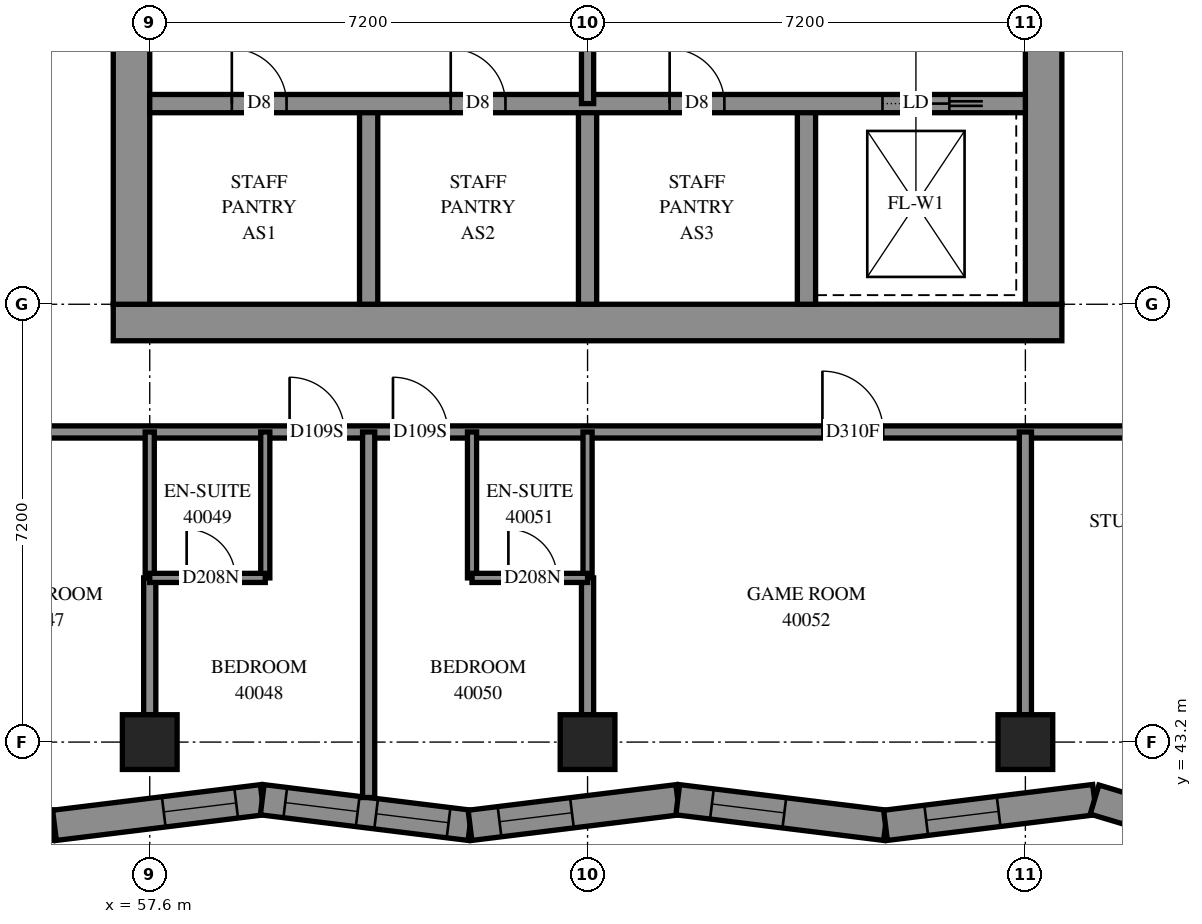
"""IFC4 building model, lengths in metres.
Left out: names, types, materials, properties, quantities, classifications, styles, units other than length and angle.
Written with IfcOpenShell. Run it as: python <this file> out.ifc"""

import sys

from ifc_helpers import new_model, si_unit, direction, frame, frame_2d, origin, origin_2d, place, context, subcontext, project, spatial, polyline, rectangle, outline, extrude, element, fill, save


model = new_model("IFC4")
c1 = context("Model", 3, precision=1e-05, world=origin(), true_north=direction((0.0, 1.0)))
c2 = subcontext(c1, "Body", "Model", "MODEL_VIEW")
j1 = project(units=[si_unit("LENGTHUNIT", "METRE"), si_unit("PLANEANGLEUNIT", "RADIAN")], contexts=[c1])
p1 = place(None, origin())
s1 = spatial("IfcSite", under=j1, at=p1, CompositionType="ELEMENT")
p2 = place(p1, origin())
s2 = spatial("IfcBuilding", under=s1, at=p2, CompositionType="ELEMENT")
p3 = place(p2, frame((0.0, 0.0, 149.0)))
s3 = spatial("IfcBuildingStorey", under=s2, at=p3, CompositionType="ELEMENT", Elevation=149.0)
for number, where, z_axis, x_axis in (
    (1, (57.6, 43.2, 0.0), (0.0, 0.0, 1.0), (1.0, 0.0, 0.0)),
    (2, (64.8, 43.2, 0.0), (0.0, 0.0, 1.0), (1.0, 0.0, 0.0)),
    (3, (72.0, 43.2, 0.0), (0.0, 0.0, 1.0), (1.0, 0.0, 0.0)),
):
    element("IfcColumn", number, at=place(p3, frame(where, z_axis=z_axis, x_axis=x_axis)), inside=s3, PredefinedType="COLUMN", context=c2, shape_type="SweptSolid", body=[
        extrude(rectangle(XDim=0.9, YDim=0.9, at=origin_2d()), origin(), (0.0, 0.0, 1.0), 3.1),
    ])
p4 = place(p3, frame((57.0, 50.1, -0.3), z_axis=(0.0, 0.0, 1.0), x_axis=(1.0, 0.0, 0.0)))
e4 = element("IfcWall", 4, at=p4, inside=s3, PredefinedType="SHEAR", context=c2, shape_type="SweptSolid", body=[
    extrude(rectangle(XDim=15.6, YDim=0.6, at=frame_2d((7.8, 0.0))), origin(), (0.0, 0.0, 1.0), 2.7),
])
p5 = place(p3, frame((57.3, 50.4, -0.3), z_axis=(0.0, 0.0, 1.0), x_axis=(0.0, 1.0, 0.0)))
e5 = element("IfcWall", 5, at=p5, inside=s3, PredefinedType="SHEAR", context=c2, shape_type="SweptSolid", body=[
    extrude(rectangle(XDim=14.4, YDim=0.6, at=frame_2d((7.2, 0.0))), origin(), (0.0, 0.0, 1.0), 2.7),
])
p6 = place(p5, frame((4.55, 0.0, 0.3)))
e6 = element("IfcOpeningElement", 6, at=p6, cuts=e5, PredefinedType="OPENING", context=c2, shape_type="SweptSolid", body=[
    extrude(rectangle(XDim=1.1, YDim=2.1, at=frame_2d((0.55, 1.05))), frame((0.0, 0.31, 0.0), z_axis=(0.0, -1.0, 0.0), x_axis=(1.0, 0.0, 0.0)), (0.0, 0.0, 1.0), 0.62),
])
p7 = place(p5, frame((11.35, 0.0, 0.3)))
e7 = element("IfcOpeningElement", 7, at=p7, cuts=e5, PredefinedType="OPENING", context=c2, shape_type="SweptSolid", body=[
    extrude(rectangle(XDim=1.1, YDim=2.1, at=frame_2d((0.55, 1.05))), frame((0.0, 0.31, 0.0), z_axis=(0.0, -1.0, 0.0), x_axis=(1.0, 0.0, 0.0)), (0.0, 0.0, 1.0), 0.62),
])
p8 = place(p3, frame((72.3, 50.4, -0.3), z_axis=(0.0, 0.0, 1.0), x_axis=(0.0, 1.0, 0.0)))
e8 = element("IfcWall", 8, at=p8, inside=s3, PredefinedType="SHEAR", context=c2, shape_type="SweptSolid", body=[
    extrude(rectangle(XDim=14.4, YDim=0.6, at=frame_2d((7.2, 0.0))), origin(), (0.0, 0.0, 1.0), 2.7),
])
p9 = place(p8, frame((4.55, 0.0, 0.3)))
e9 = element("IfcOpeningElement", 9, at=p9, cuts=e8, PredefinedType="OPENING", context=c2, shape_type="SweptSolid", body=[
    extrude(rectangle(XDim=1.1, YDim=2.1, at=frame_2d((0.55, 1.05))), frame((0.0, 0.31, 0.0), z_axis=(0.0, -1.0, 0.0), x_axis=(1.0, 0.0, 0.0)), (0.0, 0.0, 1.0), 0.62),
])
p10 = place(p8, frame((11.35, 0.0, 0.3)))
e10 = element("IfcOpeningElement", 10, at=p10, cuts=e8, PredefinedType="OPENING", context=c2, shape_type="SweptSolid", body=[
    extrude(rectangle(XDim=1.1, YDim=2.1, at=frame_2d((0.55, 1.05))), frame((0.0, 0.31, 0.0), z_axis=(0.0, -1.0, 0.0), x_axis=(1.0, 0.0, 0.0)), (0.0, 0.0, 1.0), 0.62),
])
for number, where, z_axis, x_axis in (
    (11, (61.2, 50.4, 0.0), (0.0, 0.0, 1.0), (0.0, 1.0, 0.0)),
    (12, (64.8, 50.4, 0.0), (0.0, 0.0, 1.0), (0.0, 1.0, 0.0)),
    (13, (68.4, 50.4, 0.0), (0.0, 0.0, 1.0), (0.0, 1.0, 0.0)),
):
    element("IfcWall", number, at=place(p3, frame(where, z_axis=z_axis, x_axis=x_axis)), inside=s3, PredefinedType="SOLIDWALL", context=c2, shape_type="SweptSolid", body=[
        extrude(rectangle(XDim=3.3, YDim=0.3, at=frame_2d((1.65, 0.0))), origin(), (0.0, 0.0, 1.0), 3.1),
    ])
p11 = place(p3, frame((57.6, 53.7, 0.0), z_axis=(0.0, 0.0, 1.0), x_axis=(1.0, 0.0, 0.0)))
e14 = element("IfcWall", 14, at=p11, inside=s3, PredefinedType="SOLIDWALL", context=c2, shape_type="SweptSolid", body=[
    extrude(rectangle(XDim=14.4, YDim=0.3, at=frame_2d((7.2, 0.0))), origin(), (0.0, 0.0, 1.0), 3.1),
])
p12 = place(p11, frame((1.35, 0.0, 0.0)))
e15 = element("IfcOpeningElement", 15, at=p12, cuts=e14, PredefinedType="OPENING", context=c2, shape_type="SweptSolid", body=[
    extrude(rectangle(XDim=0.9, YDim=2.1, at=frame_2d((0.45, 1.05))), frame((0.0, 0.16, 0.0), z_axis=(0.0, -1.0, 0.0), x_axis=(1.0, 0.0, 0.0)), (0.0, 0.0, 1.0), 0.32),
])
p13 = place(p11, frame((4.95, 0.0, 0.0)))
e16 = element("IfcOpeningElement", 16, at=p13, cuts=e14, PredefinedType="OPENING", context=c2, shape_type="SweptSolid", body=[
    extrude(rectangle(XDim=0.9, YDim=2.1, at=frame_2d((0.45, 1.05))), frame((0.0, 0.16, 0.0), z_axis=(0.0, -1.0, 0.0), x_axis=(1.0, 0.0, 0.0)), (0.0, 0.0, 1.0), 0.32),
])
p14 = place(p11, frame((8.55, 0.0, 0.0)))
e17 = element("IfcOpeningElement", 17, at=p14, cuts=e14, PredefinedType="OPENING", context=c2, shape_type="SweptSolid", body=[
    extrude(rectangle(XDim=0.9, YDim=2.1, at=frame_2d((0.45, 1.05))), frame((0.0, 0.16, 0.0), z_axis=(0.0, -1.0, 0.0), x_axis=(1.0, 0.0, 0.0)), (0.0, 0.0, 1.0), 0.32),
])
p15 = place(p11, frame((12.05, 0.0, 0.0)))
e18 = element("IfcOpeningElement", 18, at=p15, cuts=e14, PredefinedType="OPENING", context=c2, shape_type="SweptSolid", body=[
    extrude(rectangle(XDim=1.1, YDim=2.1, at=frame_2d((0.55, 1.05))), frame((0.0, 0.16, 0.0), z_axis=(0.0, -1.0, 0.0), x_axis=(1.0, 0.0, 0.0)), (0.0, 0.0, 1.0), 0.32),
])
p16 = place(p3, frame((52.595, 42.255, 0.0), z_axis=(0.0, 0.0, 1.0), x_axis=(0.9924948483, -0.1222864508, 0.0)))
e19 = element("IfcWall", 19, at=p16, inside=s3, PredefinedType="SOLIDWALL", context=c2, shape_type="SweptSolid", body=[
    extrude(outline(polyline([(0.052, -0.25), (3.495, -0.25), (3.433, 0.25), (-0.052, 0.25), (0.052, -0.25)])), origin(), (0.0, 0.0, 1.0), 3.1),
])
p17 = place(p16, frame((1.724, 0.0, 0.45)))
e20 = element("IfcOpeningElement", 20, at=p17, cuts=e19, PredefinedType="OPENING", context=c2, shape_type="SweptSolid", body=[
    extrude(rectangle(XDim=1.2, YDim=2.5, at=frame_2d((0.6, 1.25))), frame((0.0, 0.26, 0.0), z_axis=(0.0, -1.0, 0.0), x_axis=(1.0, 0.0, 0.0)), (0.0, 0.0, 1.0), 0.52),
])
p18 = place(p3, frame((56.033, 41.831, 0.0), z_axis=(0.0, 0.0, 1.0), x_axis=(0.9924939881, 0.122293432, 0.0)))
e21 = element("IfcWall", 21, at=p18, inside=s3, PredefinedType="SOLIDWALL", context=c2, shape_type="SweptSolid", body=[
    extrude(outline(polyline([(-0.031, -0.25), (3.412, -0.25), (3.473, 0.25), (0.031, 0.25), (-0.031, -0.25)])), origin(), (0.0, 0.0, 1.0), 3.1),
])
p19 = place(p18, frame((1.81, 0.0, 0.45)))
e22 = element("IfcOpeningElement", 22, at=p19, cuts=e21, PredefinedType="OPENING", context=c2, shape_type="SweptSolid", body=[
    extrude(rectangle(XDim=1.2, YDim=2.5, at=frame_2d((0.6, 1.25))), frame((0.0, 0.26, 0.0), z_axis=(0.0, -1.0, 0.0), x_axis=(1.0, 0.0, 0.0)), (0.0, 0.0, 1.0), 0.52),
])
p20 = place(p3, frame((59.45, 42.252, 0.0), z_axis=(0.0, 0.0, 1.0), x_axis=(0.9924935537, -0.1222969578, 0.0)))
e23 = element("IfcWall", 23, at=p20, inside=s3, PredefinedType="SOLIDWALL", context=c2, shape_type="SweptSolid", body=[
    extrude(outline(polyline([(0.031, -0.25), (3.473, -0.25), (3.412, 0.25), (-0.031, 0.25), (0.031, -0.25)])), origin(), (0.0, 0.0, 1.0), 3.1),
])
p21 = place(p20, frame((0.382, 0.0, 0.45)))
e24 = element("IfcOpeningElement", 24, at=p21, cuts=e23, PredefinedType="OPENING", context=c2, shape_type="SweptSolid", body=[
    extrude(rectangle(XDim=1.2, YDim=2.5, at=frame_2d((0.6, 1.25))), frame((0.0, 0.26, 0.0), z_axis=(0.0, -1.0, 0.0), x_axis=(1.0, 0.0, 0.0)), (0.0, 0.0, 1.0), 0.52),
])
p22 = place(p20, frame((1.887, 0.0, 0.45)))
e25 = element("IfcOpeningElement", 25, at=p22, cuts=e23, PredefinedType="OPENING", context=c2, shape_type="SweptSolid", body=[
    extrude(rectangle(XDim=1.2, YDim=2.5, at=frame_2d((0.6, 1.25))), frame((0.0, 0.26, 0.0), z_axis=(0.0, -1.0, 0.0), x_axis=(1.0, 0.0, 0.0)), (0.0, 0.0, 1.0), 0.52),
])
p23 = place(p3, frame((62.867, 41.831, 0.0), z_axis=(0.0, 0.0, 1.0), x_axis=(0.9924935537, 0.1222969578, 0.0)))
e26 = element("IfcWall", 26, at=p23, inside=s3, PredefinedType="SOLIDWALL", context=c2, shape_type="SweptSolid", body=[
    extrude(outline(polyline([(-0.031, -0.25), (3.412, -0.25), (3.473, 0.25), (0.031, 0.25), (-0.031, -0.25)])), origin(), (0.0, 0.0, 1.0), 3.1),
])
p24 = place(p23, frame((0.489, 0.0, 0.45)))
e27 = element("IfcOpeningElement", 27, at=p24, cuts=e26, PredefinedType="OPENING", context=c2, shape_type="SweptSolid", body=[
    extrude(rectangle(XDim=1.2, YDim=2.5, at=frame_2d((0.6, 1.25))), frame((0.0, 0.26, 0.0), z_axis=(0.0, -1.0, 0.0), x_axis=(1.0, 0.0, 0.0)), (0.0, 0.0, 1.0), 0.52),
])
p25 = place(p3, frame((66.283, 42.252, 0.0), z_axis=(0.0, 0.0, 1.0), x_axis=(0.9924935537, -0.1222969578, 0.0)))
e28 = element("IfcWall", 28, at=p25, inside=s3, PredefinedType="SOLIDWALL", context=c2, shape_type="SweptSolid", body=[
    extrude(outline(polyline([(0.031, -0.25), (3.473, -0.25), (3.412, 0.25), (-0.031, 0.25), (0.031, -0.25)])), origin(), (0.0, 0.0, 1.0), 3.1),
])
p26 = place(p25, frame((0.566, 0.0, 0.45)))
e29 = element("IfcOpeningElement", 29, at=p26, cuts=e28, PredefinedType="OPENING", context=c2, shape_type="SweptSolid", body=[
    extrude(rectangle(XDim=1.2, YDim=2.5, at=frame_2d((0.6, 1.25))), frame((0.0, 0.26, 0.0), z_axis=(0.0, -1.0, 0.0), x_axis=(1.0, 0.0, 0.0)), (0.0, 0.0, 1.0), 0.52),
])
p27 = place(p3, frame((69.7, 41.831, 0.0), z_axis=(0.0, 0.0, 1.0), x_axis=(0.99249528, 0.1222829472, 0.0)))
e30 = element("IfcWall", 30, at=p27, inside=s3, PredefinedType="SOLIDWALL", context=c2, shape_type="SweptSolid", body=[
    extrude(outline(polyline([(-0.031, -0.25), (3.412, -0.25), (3.516, 0.25), (0.031, 0.25), (-0.031, -0.25)])), origin(), (0.0, 0.0, 1.0), 3.1),
])
p28 = place(p27, frame((0.674, 0.0, 0.45)))
e31 = element("IfcOpeningElement", 31, at=p28, cuts=e30, PredefinedType="OPENING", context=c2, shape_type="SweptSolid", body=[
    extrude(rectangle(XDim=1.2, YDim=2.5, at=frame_2d((0.6, 1.25))), frame((0.0, 0.26, 0.0), z_axis=(0.0, -1.0, 0.0), x_axis=(1.0, 0.0, 0.0)), (0.0, 0.0, 1.0), 0.52),
])
p29 = place(p3, frame((73.138, 42.255, 0.0), z_axis=(0.0, 0.0, 1.0), x_axis=(0.9581356877, -0.2863145194, 0.0)))
e32 = element("IfcWall", 32, at=p29, inside=s3, PredefinedType="SOLIDWALL", context=c2, shape_type="SweptSolid", body=[
    extrude(outline(polyline([(0.052, -0.25), (3.618, -0.25), (3.681, 0.25), (-0.052, 0.25), (0.052, -0.25)])), origin(), (0.0, 0.0, 1.0), 3.1),
])
p30 = place(p29, frame((0.785, 0.0, 0.45)))
e33 = element("IfcOpeningElement", 33, at=p30, cuts=e32, PredefinedType="OPENING", context=c2, shape_type="SweptSolid", body=[
    extrude(rectangle(XDim=1.2, YDim=2.5, at=frame_2d((0.6, 1.25))), frame((0.0, 0.26, 0.0), z_axis=(0.0, -1.0, 0.0), x_axis=(1.0, 0.0, 0.0)), (0.0, 0.0, 1.0), 0.52),
])
p31 = place(p3, frame((64.8, 53.7, 0.0), z_axis=(0.0, 0.0, 1.0), x_axis=(0.0, 1.0, 0.0)))
e34 = element("IfcWall", 34, at=p31, inside=s3, PredefinedType="PARTITIONING", context=c2, shape_type="SweptSolid", body=[
    extrude(rectangle(XDim=3.6, YDim=0.2, at=frame_2d((1.8, 0.0))), origin(), (0.0, 0.0, 1.0), 3.1),
])
p32 = place(p3, frame((55.5, 48.3, 0.0), z_axis=(0.0, 0.0, 1.0), x_axis=(1.0, 0.0, 0.0)))
e35 = element("IfcWall", 35, at=p32, inside=s3, PredefinedType="PARTITIONING", context=c2, shape_type="SweptSolid", body=[
    extrude(rectangle(XDim=18.974, YDim=0.2, at=frame_2d((9.487, 0.0))), origin(), (0.0, 0.0, 1.0), 3.1),
])
p33 = place(p32, frame((4.4, 0.0, 0.0)))
e36 = element("IfcOpeningElement", 36, at=p33, cuts=e35, PredefinedType="OPENING", context=c2, shape_type="SweptSolid", body=[
    extrude(rectangle(XDim=0.9, YDim=2.1, at=frame_2d((0.45, 1.05))), frame((0.0, 0.11, 0.0), z_axis=(0.0, -1.0, 0.0), x_axis=(1.0, 0.0, 0.0)), (0.0, 0.0, 1.0), 0.22),
])
p34 = place(p32, frame((6.1, 0.0, 0.0)))
e37 = element("IfcOpeningElement", 37, at=p34, cuts=e35, PredefinedType="OPENING", context=c2, shape_type="SweptSolid", body=[
    extrude(rectangle(XDim=0.9, YDim=2.1, at=frame_2d((0.45, 1.05))), frame((0.0, 0.11, 0.0), z_axis=(0.0, -1.0, 0.0), x_axis=(1.0, 0.0, 0.0)), (0.0, 0.0, 1.0), 0.22),
])
p35 = place(p32, frame((13.162, 0.0, 0.0)))
e38 = element("IfcOpeningElement", 38, at=p35, cuts=e35, PredefinedType="OPENING", context=c2, shape_type="SweptSolid", body=[
    extrude(rectangle(XDim=1.0, YDim=2.1, at=frame_2d((0.5, 1.05))), frame((0.0, 0.11, 0.0), z_axis=(0.0, -1.0, 0.0), x_axis=(1.0, 0.0, 0.0)), (0.0, 0.0, 1.0), 0.22),
])
p36 = place(p3, frame((61.2, 42.288, 0.0), z_axis=(0.0, 0.0, 1.0), x_axis=(0.0, 1.0, 0.0)))
e39 = element("IfcWall", 39, at=p36, inside=s3, PredefinedType="PARTITIONING", context=c2, shape_type="SweptSolid", body=[
    extrude(rectangle(XDim=6.012, YDim=0.2, at=frame_2d((3.006, 0.0))), origin(), (0.0, 0.0, 1.0), 3.1),
])
p37 = place(p3, frame((72.0, 43.65, 0.0), z_axis=(0.0, 0.0, 1.0), x_axis=(0.0, 1.0, 0.0)))
e40 = element("IfcWall", 40, at=p37, inside=s3, PredefinedType="PARTITIONING", context=c2, shape_type="SweptSolid", body=[
    extrude(rectangle(XDim=4.65, YDim=0.2, at=frame_2d((2.325, 0.0))), origin(), (0.0, 0.0, 1.0), 3.1),
])
for number, where, z_axis, x_axis in (
    (41, (59.5, 45.9, 0.0), (0.0, 0.0, 1.0), (0.0, 1.0, 0.0)),
    (42, (57.6, 45.9, 0.0), (0.0, 0.0, 1.0), (0.0, 1.0, 0.0)),
    (43, (62.9, 45.9, 0.0), (0.0, 0.0, 1.0), (0.0, 1.0, 0.0)),
    (44, (64.8, 45.9, 0.0), (0.0, 0.0, 1.0), (0.0, 1.0, 0.0)),
):
    element("IfcWall", number, at=place(p3, frame(where, z_axis=z_axis, x_axis=x_axis)), inside=s3, PredefinedType="PARTITIONING", context=c2, shape_type="SweptSolid", body=[
        extrude(rectangle(XDim=2.4, YDim=0.15, at=frame_2d((1.2, 0.0))), origin(), (0.0, 0.0, 1.0), 3.1),
    ])
for number, where, z_axis, x_axis in (
    (45, (57.6, 43.65, 0.0), (0.0, 0.0, 1.0), (0.0, 1.0, 0.0)),
    (46, (64.8, 43.65, 0.0), (0.0, 0.0, 1.0), (0.0, 1.0, 0.0)),
):
    element("IfcWall", number, at=place(p3, frame(where, z_axis=z_axis, x_axis=x_axis)), inside=s3, PredefinedType="PARTITIONING", context=c2, shape_type="SweptSolid", body=[
        extrude(rectangle(XDim=2.25, YDim=0.2, at=frame_2d((1.125, 0.0))), origin(), (0.0, 0.0, 1.0), 3.1),
    ])
p38 = place(p3, frame((57.6, 45.9, 0.0), z_axis=(0.0, 0.0, 1.0), x_axis=(1.0, 0.0, 0.0)))
e47 = element("IfcWall", 47, at=p38, inside=s3, PredefinedType="PARTITIONING", context=c2, shape_type="SweptSolid", body=[
    extrude(rectangle(XDim=1.9, YDim=0.15, at=frame_2d((0.95, 0.0))), origin(), (0.0, 0.0, 1.0), 3.1),
])
p39 = place(p38, frame((0.607, 0.0, 0.0)))
e48 = element("IfcOpeningElement", 48, at=p39, cuts=e47, PredefinedType="OPENING", context=c2, shape_type="SweptSolid", body=[
    extrude(rectangle(XDim=0.8, YDim=2.1, at=frame_2d((0.4, 1.05))), frame((0.0, 0.085, 0.0), z_axis=(0.0, -1.0, 0.0), x_axis=(1.0, 0.0, 0.0)), (0.0, 0.0, 1.0), 0.17),
])
p40 = place(p3, frame((62.9, 45.9, 0.0), z_axis=(0.0, 0.0, 1.0), x_axis=(1.0, 0.0, 0.0)))
e49 = element("IfcWall", 49, at=p40, inside=s3, PredefinedType="PARTITIONING", context=c2, shape_type="SweptSolid", body=[
    extrude(rectangle(XDim=1.9, YDim=0.15, at=frame_2d((0.95, 0.0))), origin(), (0.0, 0.0, 1.0), 3.1),
])
p41 = place(p40, frame((0.598, 0.0, 0.0)))
e50 = element("IfcOpeningElement", 50, at=p41, cuts=e49, PredefinedType="OPENING", context=c2, shape_type="SweptSolid", body=[
    extrude(rectangle(XDim=0.8, YDim=2.1, at=frame_2d((0.4, 1.05))), frame((0.0, 0.085, 0.0), z_axis=(0.0, -1.0, 0.0), x_axis=(1.0, 0.0, 0.0)), (0.0, 0.0, 1.0), 0.17),
])
p42 = place(p19, origin())
e51 = element("IfcWindow", 51, at=p42, inside=s3, PartitioningType="SINGLE_PANEL", PredefinedType="WINDOW", context=c2, shape_type="SweptSolid", body=[
    extrude(rectangle(XDim=1.2, YDim=2.5, at=frame_2d((0.6, 1.25))), frame((0.0, 0.18, 0.0), z_axis=(0.0, -1.0, 0.0), x_axis=(1.0, 0.0, 0.0)), (0.0, 0.0, 1.0), 0.06),
])
fill(e22, e51)
p43 = place(p21, origin())
e52 = element("IfcWindow", 52, at=p43, inside=s3, PartitioningType="SINGLE_PANEL", PredefinedType="WINDOW", context=c2, shape_type="SweptSolid", body=[
    extrude(rectangle(XDim=1.2, YDim=2.5, at=frame_2d((0.6, 1.25))), frame((0.0, 0.18, 0.0), z_axis=(0.0, -1.0, 0.0), x_axis=(1.0, 0.0, 0.0)), (0.0, 0.0, 1.0), 0.06),
])
fill(e24, e52)
p44 = place(p22, origin())
e53 = element("IfcWindow", 53, at=p44, inside=s3, PartitioningType="SINGLE_PANEL", PredefinedType="WINDOW", context=c2, shape_type="SweptSolid", body=[
    extrude(rectangle(XDim=1.2, YDim=2.5, at=frame_2d((0.6, 1.25))), frame((0.0, 0.18, 0.0), z_axis=(0.0, -1.0, 0.0), x_axis=(1.0, 0.0, 0.0)), (0.0, 0.0, 1.0), 0.06),
])
fill(e25, e53)
p45 = place(p24, origin())
e54 = element("IfcWindow", 54, at=p45, inside=s3, PartitioningType="SINGLE_PANEL", PredefinedType="WINDOW", context=c2, shape_type="SweptSolid", body=[
    extrude(rectangle(XDim=1.2, YDim=2.5, at=frame_2d((0.6, 1.25))), frame((0.0, 0.18, 0.0), z_axis=(0.0, -1.0, 0.0), x_axis=(1.0, 0.0, 0.0)), (0.0, 0.0, 1.0), 0.06),
])
fill(e27, e54)
p46 = place(p26, origin())
e55 = element("IfcWindow", 55, at=p46, inside=s3, PartitioningType="SINGLE_PANEL", PredefinedType="WINDOW", context=c2, shape_type="SweptSolid", body=[
    extrude(rectangle(XDim=1.2, YDim=2.5, at=frame_2d((0.6, 1.25))), frame((0.0, 0.18, 0.0), z_axis=(0.0, -1.0, 0.0), x_axis=(1.0, 0.0, 0.0)), (0.0, 0.0, 1.0), 0.06),
])
fill(e29, e55)
p47 = place(p28, origin())
e56 = element("IfcWindow", 56, at=p47, inside=s3, PartitioningType="SINGLE_PANEL", PredefinedType="WINDOW", context=c2, shape_type="SweptSolid", body=[
    extrude(rectangle(XDim=1.2, YDim=2.5, at=frame_2d((0.6, 1.25))), frame((0.0, 0.18, 0.0), z_axis=(0.0, -1.0, 0.0), x_axis=(1.0, 0.0, 0.0)), (0.0, 0.0, 1.0), 0.06),
])
fill(e31, e56)
p48 = place(p12, origin())
e57 = element("IfcDoor", 57, at=p48, inside=s3, OperationType="SINGLE_SWING_LEFT", PredefinedType="DOOR", context=c2, shape_type="SweptSolid", body=[
    extrude(rectangle(XDim=0.9, YDim=2.1, at=frame_2d((0.45, 1.05))), frame((0.0, 0.025, 0.0), z_axis=(0.0, -1.0, 0.0), x_axis=(1.0, 0.0, 0.0)), (0.0, 0.0, 1.0), 0.05),
])
fill(e15, e57)
p49 = place(p13, origin())
e58 = element("IfcDoor", 58, at=p49, inside=s3, OperationType="SINGLE_SWING_LEFT", PredefinedType="DOOR", context=c2, shape_type="SweptSolid", body=[
    extrude(rectangle(XDim=0.9, YDim=2.1, at=frame_2d((0.45, 1.05))), frame((0.0, 0.025, 0.0), z_axis=(0.0, -1.0, 0.0), x_axis=(1.0, 0.0, 0.0)), (0.0, 0.0, 1.0), 0.05),
])
fill(e16, e58)
p50 = place(p14, origin())
e59 = element("IfcDoor", 59, at=p50, inside=s3, OperationType="SINGLE_SWING_LEFT", PredefinedType="DOOR", context=c2, shape_type="SweptSolid", body=[
    extrude(rectangle(XDim=0.9, YDim=2.1, at=frame_2d((0.45, 1.05))), frame((0.0, 0.025, 0.0), z_axis=(0.0, -1.0, 0.0), x_axis=(1.0, 0.0, 0.0)), (0.0, 0.0, 1.0), 0.05),
])
fill(e17, e59)
p51 = place(p15, origin())
e60 = element("IfcDoor", 60, at=p51, inside=s3, OperationType="SLIDING_TO_RIGHT", PredefinedType="DOOR", context=c2, shape_type="SweptSolid", body=[
    extrude(rectangle(XDim=1.1, YDim=2.1, at=frame_2d((0.55, 1.05))), frame((0.0, 0.025, 0.0), z_axis=(0.0, -1.0, 0.0), x_axis=(1.0, 0.0, 0.0)), (0.0, 0.0, 1.0), 0.05),
])
fill(e18, e60)
p52 = place(p33, origin())
e61 = element("IfcDoor", 61, at=p52, inside=s3, OperationType="SINGLE_SWING_LEFT", PredefinedType="DOOR", context=c2, shape_type="SweptSolid", body=[
    extrude(rectangle(XDim=0.9, YDim=2.1, at=frame_2d((0.45, 1.05))), frame((0.0, 0.025, 0.0), z_axis=(0.0, -1.0, 0.0), x_axis=(1.0, 0.0, 0.0)), (0.0, 0.0, 1.0), 0.05),
])
fill(e36, e61)
p53 = place(p39, origin())
e62 = element("IfcDoor", 62, at=p53, inside=s3, OperationType="SINGLE_SWING_RIGHT", PredefinedType="DOOR", context=c2, shape_type="SweptSolid", body=[
    extrude(rectangle(XDim=0.8, YDim=2.1, at=frame_2d((0.4, 1.05))), frame((0.0, 0.025, 0.0), z_axis=(0.0, -1.0, 0.0), x_axis=(1.0, 0.0, 0.0)), (0.0, 0.0, 1.0), 0.05),
])
fill(e48, e62)
p54 = place(p34, origin())
e63 = element("IfcDoor", 63, at=p54, inside=s3, OperationType="SINGLE_SWING_RIGHT", PredefinedType="DOOR", context=c2, shape_type="SweptSolid", body=[
    extrude(rectangle(XDim=0.9, YDim=2.1, at=frame_2d((0.45, 1.05))), frame((0.0, 0.025, 0.0), z_axis=(0.0, -1.0, 0.0), x_axis=(1.0, 0.0, 0.0)), (0.0, 0.0, 1.0), 0.05),
])
fill(e37, e63)
p55 = place(p41, origin())
e64 = element("IfcDoor", 64, at=p55, inside=s3, OperationType="SINGLE_SWING_RIGHT", PredefinedType="DOOR", context=c2, shape_type="SweptSolid", body=[
    extrude(rectangle(XDim=0.8, YDim=2.1, at=frame_2d((0.4, 1.05))), frame((0.0, 0.025, 0.0), z_axis=(0.0, -1.0, 0.0), x_axis=(1.0, 0.0, 0.0)), (0.0, 0.0, 1.0), 0.05),
])
fill(e50, e64)
p56 = place(p35, origin())
e65 = element("IfcDoor", 65, at=p56, inside=s3, OperationType="SINGLE_SWING_LEFT", PredefinedType="DOOR", context=c2, shape_type="SweptSolid", body=[
    extrude(rectangle(XDim=1.0, YDim=2.1, at=frame_2d((0.5, 1.05))), frame((0.0, 0.025, 0.0), z_axis=(0.0, -1.0, 0.0), x_axis=(1.0, 0.0, 0.0)), (0.0, 0.0, 1.0), 0.05),
])
fill(e38, e65)
save(model, sys.argv[1])
